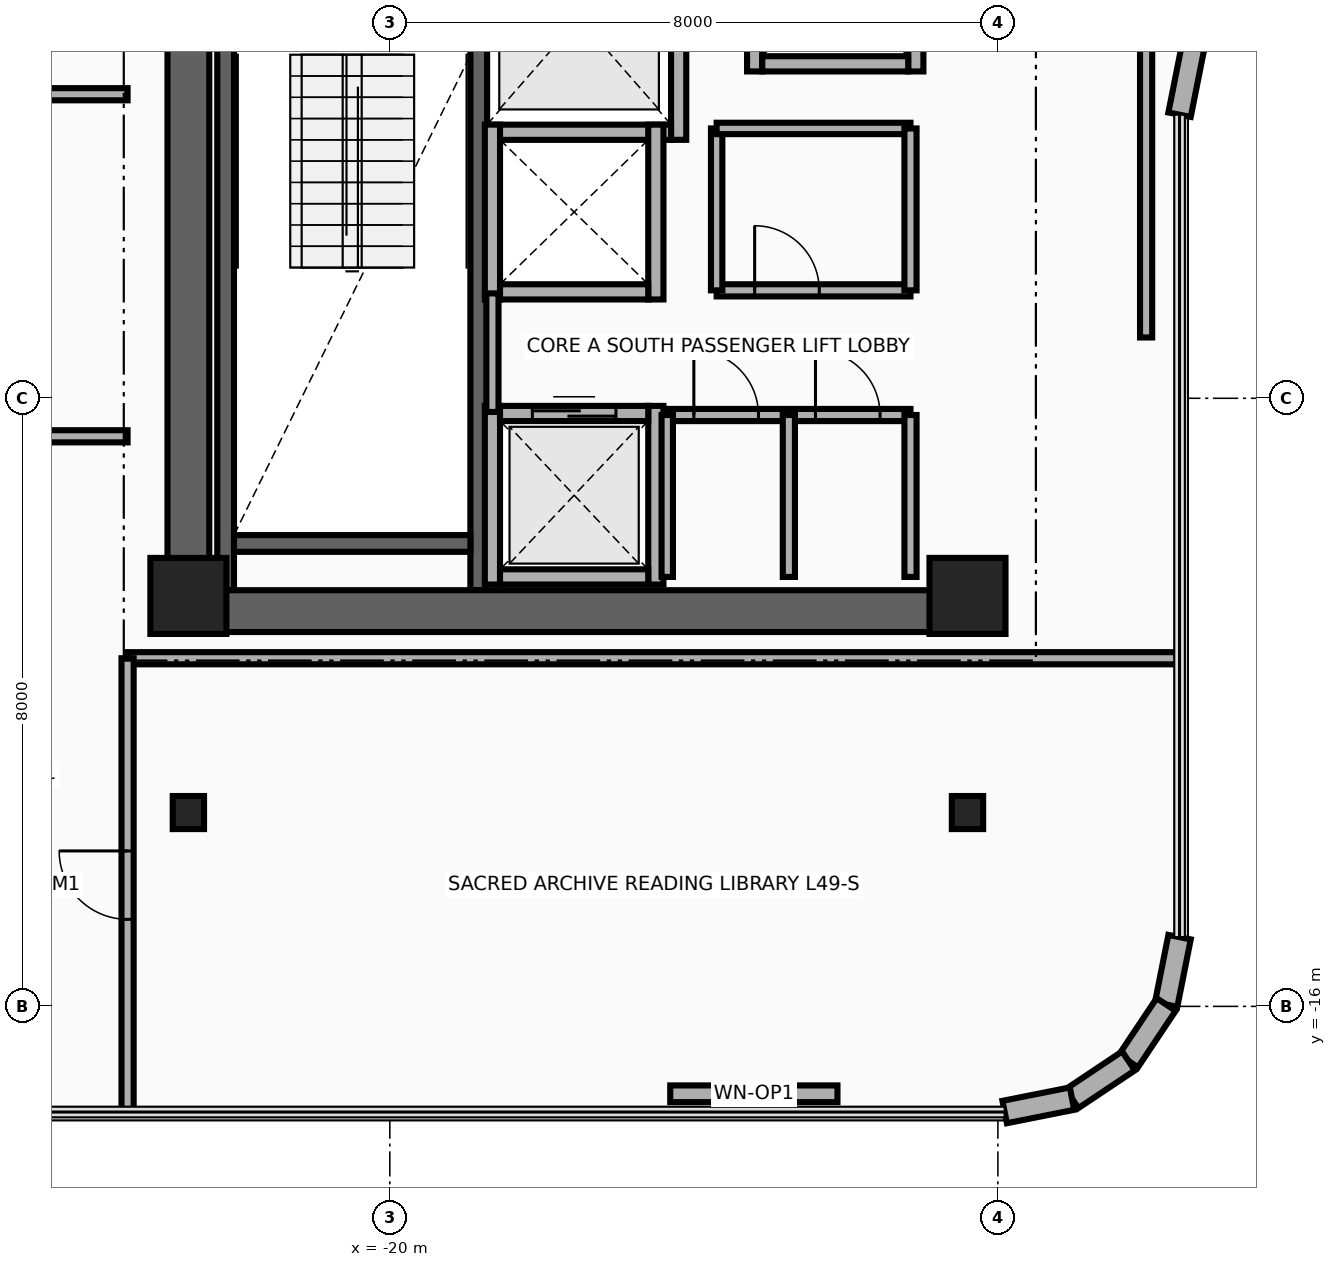
"""IFC4 building model, lengths in metres.
Left out: names, types, materials, properties, quantities, classifications, styles, units other than length and angle.
Written with IfcOpenShell. Run it as: python <this file> out.ifc"""

import sys

from ifc_helpers import new_model, si_unit, direction, frame, frame_2d, origin, origin_2d, place, context, subcontext, project, spatial, rectangle, i_section, extrude, source, transform, mapped, element, fill, save


model = new_model("IFC4")
c1 = context("Model", 3, precision=1e-05, world=origin(), true_north=direction((0.0, 1.0)))
c2 = subcontext(c1, "Body", "Model", "MODEL_VIEW")
j1 = project(units=[si_unit("LENGTHUNIT", "METRE"), si_unit("PLANEANGLEUNIT", "RADIAN")], contexts=[c1])
p1 = place(None, origin())
s1 = spatial("IfcSite", under=j1, at=p1, CompositionType="ELEMENT")
p2 = place(p1, origin())
s2 = spatial("IfcBuilding", under=s1, at=p2, CompositionType="ELEMENT")
p3 = place(p2, frame((0.0, 0.0, 192.35)))
s3 = spatial("IfcBuildingStorey", under=s2, at=p3, CompositionType="ELEMENT", Elevation=192.35)
for number, where, z_axis, x_axis in (
    (1, (-22.16, -10.525, 0.0), (0.0, 0.0, 1.0), (0.0, 1.0, 0.0)),
    (2, (-18.83, -10.525, 0.0), (0.0, 0.0, 1.0), (0.0, 1.0, 0.0)),
):
    element("IfcWall", number, at=place(p3, frame(where, z_axis=z_axis, x_axis=x_axis)), inside=s3, PredefinedType="SHEAR", context=c2, shape_type="SweptSolid", body=[
        extrude(rectangle(XDim=8.745, YDim=0.22, at=frame_2d((4.373, 0.0))), origin(), (0.0, 0.0, 1.0), 3.71),
    ])
p4 = place(p3, frame((-22.05, -9.91, 0.0), z_axis=(0.0, 0.0, 1.0), x_axis=(1.0, 0.0, 0.0)))
e3 = element("IfcWall", 3, at=p4, inside=s3, PredefinedType="SHEAR", context=c2, shape_type="SweptSolid", body=[
    extrude(rectangle(XDim=3.11, YDim=0.22, at=frame_2d((1.555, 0.0))), origin(), (0.0, 0.0, 1.0), 3.71),
])
p5 = place(p3, frame((-22.65, -11.075, 0.0), z_axis=(0.0, 0.0, 1.0), x_axis=(0.0, 1.0, 0.0)))
e4 = element("IfcWall", 4, at=p5, inside=s3, PredefinedType="SHEAR", context=c2, shape_type="SweptSolid", body=[
    extrude(rectangle(XDim=22.15, YDim=0.55, at=frame_2d((11.075, 0.0))), origin(), (0.0, 0.0, 1.0), 3.71),
])
p6 = place(p3, frame((-22.65, -10.8, 0.0), z_axis=(0.0, 0.0, 1.0), x_axis=(1.0, 0.0, 0.0)))
e5 = element("IfcWall", 5, at=p6, inside=s3, PredefinedType="SHEAR", context=c2, shape_type="SweptSolid", body=[
    extrude(rectangle(XDim=10.25, YDim=0.55, at=frame_2d((5.125, 0.0))), origin(), (0.0, 0.0, 1.0), 3.71),
])
m1 = source(origin(), c2, "Body", "SweptSolid", [
    extrude(rectangle(XDim=1.0, YDim=1.0, at=origin_2d()), origin(), (0.0, 0.0, 1.0), 3.95),
])
for number, where, z_axis, x_axis in (
    (6, (-22.65, -10.6, 0.0), (0.0, 0.0, 1.0), (1.0, 0.0, 0.0)),
    (7, (-12.4, -10.6, 0.0), (0.0, 0.0, 1.0), (1.0, 0.0, 0.0)),
):
    element("IfcColumn", number, at=place(p3, frame(where, z_axis=z_axis, x_axis=x_axis)), inside=s3, PredefinedType="COLUMN", context=c2, shape_type="MappedRepresentation", body=[
        mapped(m1, transform((0.0, 0.0, 0.0), x_axis=(1.0, 0.0, 0.0), y_axis=(0.0, 1.0, 0.0), z_axis=(0.0, 0.0, 1.0), scale=1.0)),
    ])
m2 = source(origin(), c2, "Body", "SweptSolid", [
    extrude(i_section(OverallWidth=0.412, OverallDepth=0.435, WebThickness=0.036, FlangeThickness=0.057, at=origin_2d()), origin(), (0.0, 0.0, 1.0), 3.95),
])
for number, where, z_axis, x_axis in (
    (8, (-22.65, -13.45, 0.0), (0.0, 0.0, 1.0), (1.0, 0.0, 0.0)),
    (9, (-12.4, -13.45, 0.0), (0.0, 0.0, 1.0), (1.0, 0.0, 0.0)),
):
    element("IfcColumn", number, at=place(p3, frame(where, z_axis=z_axis, x_axis=x_axis)), inside=s3, PredefinedType="COLUMN", context=c2, shape_type="MappedRepresentation", body=[
        mapped(m2, transform((0.0, 0.0, 0.0), x_axis=(1.0, 0.0, 0.0), y_axis=(0.0, 1.0, 0.0), z_axis=(0.0, 0.0, 1.0), scale=1.0)),
    ])
p7 = place(p3, frame((-9.43, -3.365, 0.0), z_axis=(0.0, 0.0, 1.0), x_axis=(-0.195301801101, -0.980743190895, 0.0)))
e10 = element("IfcWall", 10, at=p7, inside=s3, PredefinedType="SOLIDWALL", context=c2, shape_type="SweptSolid", body=[
    extrude(rectangle(XDim=0.923, YDim=0.3, at=frame_2d((0.461, 0.0))), origin(), (0.0, 0.0, 1.0), 3.71),
])
p8 = place(p3, frame((-9.61, -15.089, 0.0), z_axis=(0.0, 0.0, 1.0), x_axis=(-0.195025152871, -0.980798241101, 0.0)))
e11 = element("IfcWall", 11, at=p8, inside=s3, PredefinedType="SOLIDWALL", context=c2, shape_type="SweptSolid", body=[
    extrude(rectangle(XDim=0.904, YDim=0.3, at=frame_2d((0.452, 0.0))), origin(), (0.0, 0.0, 1.0), 3.71),
])
for number, where, z_axis, x_axis in (
    (12, (-9.786, -15.976, 0.0), (0.0, 0.0, 1.0), (-0.556, -0.832, 0.0)),
    (13, (-10.282, -16.718, 0.0), (0.0, 0.0, 1.0), (-0.832, -0.556, 0.0)),
):
    element("IfcWall", number, at=place(p3, frame(where, z_axis=z_axis, x_axis=x_axis)), inside=s3, PredefinedType="SOLIDWALL", context=c2, shape_type="SweptSolid", body=[
        extrude(rectangle(XDim=0.893, YDim=0.3, at=frame_2d((0.446, 0.0))), origin(), (0.0, 0.0, 1.0), 3.71),
    ])
p9 = place(p3, frame((-11.024, -17.214, 0.0), z_axis=(0.0, 0.0, 1.0), x_axis=(-0.980798241101, -0.195025152871, 0.0)))
e14 = element("IfcWall", 14, at=p9, inside=s3, PredefinedType="SOLIDWALL", context=c2, shape_type="SweptSolid", body=[
    extrude(rectangle(XDim=0.904, YDim=0.3, at=frame_2d((0.452, 0.0))), origin(), (0.0, 0.0, 1.0), 3.71),
])
p10 = place(p3, frame((-14.111, -17.15, 0.0), z_axis=(0.0, 0.0, 1.0), x_axis=(-1.0, 0.0, 0.0)))
e15 = element("IfcWall", 15, at=p10, inside=s3, PredefinedType="SOLIDWALL", context=c2, shape_type="SweptSolid", body=[
    extrude(rectangle(XDim=2.2, YDim=0.22, at=frame_2d((1.1, 0.0))), origin(), (0.0, 0.0, 1.0), 3.71),
])
p11 = place(p10, frame((0.65, 0.0, 0.95)))
e16 = element("IfcOpeningElement", 16, at=p11, cuts=e15, PredefinedType="OPENING", context=c2, shape_type="SweptSolid", body=[
    extrude(rectangle(XDim=0.9, YDim=1.3, at=frame_2d((0.45, 0.65))), frame((0.0, 0.125, 0.0), z_axis=(0.0, -1.0, 0.0), x_axis=(1.0, 0.0, 0.0)), (0.0, 0.0, 1.0), 0.25),
])
p12 = place(p3, frame((-16.2, -4.6, 0.0), z_axis=(0.0, 0.0, 1.0), x_axis=(0.0, 1.0, 0.0)))
e17 = element("IfcWall", 17, at=p12, inside=s3, PredefinedType="MOVABLE", context=c2, shape_type="SweptSolid", body=[
    extrude(rectangle(XDim=3.2, YDim=0.2, at=frame_2d((1.6, 0.0))), origin(), (0.0, 0.0, 1.0), 3.71),
])
p13 = place(p3, frame((-18.72, -4.5, 0.0), z_axis=(0.0, 0.0, 1.0), x_axis=(1.0, 0.0, 0.0)))
e18 = element("IfcWall", 18, at=p13, inside=s3, PredefinedType="MOVABLE", context=c2, shape_type="SweptSolid", body=[
    extrude(rectangle(XDim=2.42, YDim=0.2, at=frame_2d((1.21, 0.0))), origin(), (0.0, 0.0, 1.0), 3.71),
])
for number, where, z_axis, x_axis in (
    (19, (-18.65, -10.45, 0.0), (0.0, 0.0, 1.0), (0.0, 1.0, 0.0)),
    (20, (-16.5, -10.45, 0.0), (0.0, 0.0, 1.0), (0.0, 1.0, 0.0)),
):
    element("IfcWall", number, at=place(p3, frame(where, z_axis=z_axis, x_axis=x_axis)), inside=s3, PredefinedType="MOVABLE", context=c2, shape_type="SweptSolid", body=[
        extrude(rectangle(XDim=2.35, YDim=0.2, at=frame_2d((1.175, 0.0))), origin(), (0.0, 0.0, 1.0), 2.994),
    ])
p14 = place(p3, frame((-18.55, -10.35, 0.0), z_axis=(0.0, 0.0, 1.0), x_axis=(1.0, 0.0, 0.0)))
e21 = element("IfcWall", 21, at=p14, inside=s3, PredefinedType="MOVABLE", context=c2, shape_type="SweptSolid", body=[
    extrude(rectangle(XDim=1.95, YDim=0.2, at=frame_2d((0.975, 0.0))), origin(), (0.0, 0.0, 1.0), 2.994),
])
p15 = place(p3, frame((-18.55, -8.2, 0.0), z_axis=(0.0, 0.0, 1.0), x_axis=(1.0, 0.0, 0.0)))
e22 = element("IfcWall", 22, at=p15, inside=s3, PredefinedType="MOVABLE", context=c2, shape_type="SweptSolid", body=[
    extrude(rectangle(XDim=1.95, YDim=0.2, at=frame_2d((0.975, 0.0))), origin(), (0.0, 0.0, 1.0), 3.71),
])
p16 = place(p15, frame((0.425, 0.0, 0.0)))
e23 = element("IfcOpeningElement", 23, at=p16, cuts=e22, PredefinedType="OPENING", context=c2, shape_type="SweptSolid", body=[
    extrude(rectangle(XDim=1.1, YDim=2.1, at=frame_2d((0.55, 1.05))), frame((0.0, 0.115, 0.0), z_axis=(0.0, -1.0, 0.0), x_axis=(1.0, 0.0, 0.0)), (0.0, 0.0, 1.0), 0.23),
])
for number, where, z_axis, x_axis in (
    (24, (-18.65, -6.7, 0.0), (0.0, 0.0, 1.0), (0.0, 1.0, 0.0)),
    (25, (-16.5, -6.7, 0.0), (0.0, 0.0, 1.0), (0.0, 1.0, 0.0)),
):
    element("IfcWall", number, at=place(p3, frame(where, z_axis=z_axis, x_axis=x_axis)), inside=s3, PredefinedType="MOVABLE", context=c2, shape_type="SweptSolid", body=[
        extrude(rectangle(XDim=2.3, YDim=0.2, at=frame_2d((1.15, 0.0))), origin(), (0.0, 0.0, 1.0), 3.71),
    ])
p17 = place(p3, frame((-18.55, -6.6, 0.0), z_axis=(0.0, 0.0, 1.0), x_axis=(1.0, 0.0, 0.0)))
e26 = element("IfcWall", 26, at=p17, inside=s3, PredefinedType="MOVABLE", context=c2, shape_type="SweptSolid", body=[
    extrude(rectangle(XDim=1.95, YDim=0.2, at=frame_2d((0.975, 0.0))), origin(), (0.0, 0.0, 1.0), 3.71),
])
for number, where, z_axis, x_axis in (
    (27, (-15.2, -3.7, 0.0), (0.0, 0.0, 1.0), (0.0, 1.0, 0.0)),
    (28, (-13.08, -3.7, 0.0), (0.0, 0.0, 1.0), (0.0, 1.0, 0.0)),
):
    element("IfcWall", number, at=place(p3, frame(where, z_axis=z_axis, x_axis=x_axis)), inside=s3, PredefinedType="MOVABLE", context=c2, shape_type="SweptSolid", body=[
        extrude(rectangle(XDim=2.35, YDim=0.2, at=frame_2d((1.175, 0.0))), origin(), (0.0, 0.0, 1.0), 3.71),
    ])
p18 = place(p3, frame((-15.1, -3.6, 0.0), z_axis=(0.0, 0.0, 1.0), x_axis=(1.0, 0.0, 0.0)))
e29 = element("IfcWall", 29, at=p18, inside=s3, PredefinedType="MOVABLE", context=c2, shape_type="SweptSolid", body=[
    extrude(rectangle(XDim=1.92, YDim=0.2, at=frame_2d((0.96, 0.0))), origin(), (0.0, 0.0, 1.0), 3.71),
])
p19 = place(p3, frame((-18.65, -8.18, 0.0), z_axis=(0.0, 0.0, 1.0), x_axis=(0.0, 1.0, 0.0)))
e30 = element("IfcWall", 30, at=p19, inside=s3, PredefinedType="PARTITIONING", context=c2, shape_type="SweptSolid", body=[
    extrude(rectangle(XDim=1.56, YDim=0.16, at=frame_2d((0.78, 0.0))), origin(), (0.0, 0.0, 1.0), 3.71),
])
p20 = place(p3, frame((-16.35, -8.22, 0.0), z_axis=(0.0, 0.0, 1.0), x_axis=(1.0, 0.0, 0.0)))
e31 = element("IfcWall", 31, at=p20, inside=s3, PredefinedType="PARTITIONING", context=c2, shape_type="SweptSolid", body=[
    extrude(rectangle(XDim=3.2, YDim=0.16, at=frame_2d((1.6, 0.0))), origin(), (0.0, 0.0, 1.0), 3.71),
])
p21 = place(p20, frame((0.35, 0.0, 0.0)))
e32 = element("IfcOpeningElement", 32, at=p21, cuts=e31, PredefinedType="OPENING", context=c2, shape_type="SweptSolid", body=[
    extrude(rectangle(XDim=0.85, YDim=2.05, at=frame_2d((0.425, 1.025))), frame((0.0, 0.095, 0.0), z_axis=(0.0, -1.0, 0.0), x_axis=(1.0, 0.0, 0.0)), (0.0, 0.0, 1.0), 0.19),
])
p22 = place(p20, frame((1.95, 0.0, 0.0)))
e33 = element("IfcOpeningElement", 33, at=p22, cuts=e31, PredefinedType="OPENING", context=c2, shape_type="SweptSolid", body=[
    extrude(rectangle(XDim=0.85, YDim=2.05, at=frame_2d((0.425, 1.025))), frame((0.0, 0.095, 0.0), z_axis=(0.0, -1.0, 0.0), x_axis=(1.0, 0.0, 0.0)), (0.0, 0.0, 1.0), 0.19),
])
p23 = place(p3, frame((-16.35, -10.35, 0.0), z_axis=(0.0, 0.0, 1.0), x_axis=(0.0, 1.0, 0.0)))
e34 = element("IfcWall", 34, at=p23, inside=s3, PredefinedType="PARTITIONING", context=c2, shape_type="SweptSolid", body=[
    extrude(rectangle(XDim=2.13, YDim=0.15, at=frame_2d((1.065, 0.0))), origin(), (0.0, 0.0, 1.0), 3.71),
])
for number, where, z_axis, x_axis in (
    (35, (-13.15, -10.35, 0.0), (0.0, 0.0, 1.0), (0.0, 1.0, 0.0)),
    (36, (-14.75, -10.35, 0.0), (0.0, 0.0, 1.0), (0.0, 1.0, 0.0)),
):
    element("IfcWall", number, at=place(p3, frame(where, z_axis=z_axis, x_axis=x_axis)), inside=s3, PredefinedType="PARTITIONING", context=c2, shape_type="SweptSolid", body=[
        extrude(rectangle(XDim=2.13, YDim=0.16, at=frame_2d((1.065, 0.0))), origin(), (0.0, 0.0, 1.0), 3.71),
    ])
p24 = place(p3, frame((-15.7, -6.58, 0.0), z_axis=(0.0, 0.0, 1.0), x_axis=(1.0, 0.0, 0.0)))
e37 = element("IfcWall", 37, at=p24, inside=s3, PredefinedType="PARTITIONING", context=c2, shape_type="SweptSolid", body=[
    extrude(rectangle(XDim=2.55, YDim=0.16, at=frame_2d((1.275, 0.0))), origin(), (0.0, 0.0, 1.0), 3.71),
])
p25 = place(p24, frame((0.5, 0.0, 0.0)))
e38 = element("IfcOpeningElement", 38, at=p25, cuts=e37, PredefinedType="OPENING", context=c2, shape_type="SweptSolid", body=[
    extrude(rectangle(XDim=0.85, YDim=2.05, at=frame_2d((0.425, 1.025))), frame((0.0, 0.095, 0.0), z_axis=(0.0, -1.0, 0.0), x_axis=(1.0, 0.0, 0.0)), (0.0, 0.0, 1.0), 0.19),
])
p26 = place(p3, frame((-15.7, -6.58, 0.0), z_axis=(0.0, 0.0, 1.0), x_axis=(0.0, 1.0, 0.0)))
e39 = element("IfcWall", 39, at=p26, inside=s3, PredefinedType="PARTITIONING", context=c2, shape_type="SweptSolid", body=[
    extrude(rectangle(XDim=2.13, YDim=0.15, at=frame_2d((1.065, 0.0))), origin(), (0.0, 0.0, 1.0), 3.71),
])
p27 = place(p3, frame((-15.7, -4.45, 0.0), z_axis=(0.0, 0.0, 1.0), x_axis=(1.0, 0.0, 0.0)))
e40 = element("IfcWall", 40, at=p27, inside=s3, PredefinedType="PARTITIONING", context=c2, shape_type="SweptSolid", body=[
    extrude(rectangle(XDim=2.55, YDim=0.15, at=frame_2d((1.275, 0.0))), origin(), (0.0, 0.0, 1.0), 3.71),
])
p28 = place(p3, frame((-13.15, -6.58, 0.0), z_axis=(0.0, 0.0, 1.0), x_axis=(0.0, 1.0, 0.0)))
e41 = element("IfcWall", 41, at=p28, inside=s3, PredefinedType="PARTITIONING", context=c2, shape_type="SweptSolid", body=[
    extrude(rectangle(XDim=2.13, YDim=0.16, at=frame_2d((1.065, 0.0))), origin(), (0.0, 0.0, 1.0), 3.71),
])
p29 = place(p3, frame((-23.45, -11.42, 0.0), z_axis=(0.0, 0.0, 1.0), x_axis=(1.0, 0.0, 0.0)))
e42 = element("IfcWall", 42, at=p29, inside=s3, PredefinedType="PARTITIONING", context=c2, shape_type="SweptSolid", body=[
    extrude(rectangle(XDim=13.84, YDim=0.16, at=frame_2d((6.92, 0.0))), origin(), (0.0, 0.0, 1.0), 3.084),
])
p30 = place(p3, frame((-23.45, -17.39, 0.0), z_axis=(0.0, 0.0, 1.0), x_axis=(0.0, 1.0, 0.0)))
e43 = element("IfcWall", 43, at=p30, inside=s3, PredefinedType="PARTITIONING", context=c2, shape_type="SweptSolid", body=[
    extrude(rectangle(XDim=5.97, YDim=0.16, at=frame_2d((2.985, 0.0))), origin(), (0.0, 0.0, 1.0), 3.71),
])
p31 = place(p30, frame((2.535, 0.0, 0.0)))
e44 = element("IfcOpeningElement", 44, at=p31, cuts=e43, PredefinedType="OPENING", context=c2, shape_type="SweptSolid", body=[
    extrude(rectangle(XDim=0.9, YDim=2.1, at=frame_2d((0.45, 1.05))), frame((0.0, 0.095, 0.0), z_axis=(0.0, -1.0, 0.0), x_axis=(1.0, 0.0, 0.0)), (0.0, 0.0, 1.0), 0.19),
])
p32 = place(p3, frame((-30.89, -8.5, 0.0), z_axis=(0.0, 0.0, 1.0), x_axis=(1.0, 0.0, 0.0)))
e45 = element("IfcWall", 45, at=p32, inside=s3, PredefinedType="PARTITIONING", context=c2, shape_type="SweptSolid", body=[
    extrude(rectangle(XDim=7.44, YDim=0.16, at=frame_2d((3.72, 0.0))), origin(), (0.0, 0.0, 1.0), 3.156),
])
p33 = place(p32, frame((2.82, 0.0, 0.0)))
e46 = element("IfcOpeningElement", 46, at=p33, cuts=e45, PredefinedType="OPENING", context=c2, shape_type="SweptSolid", body=[
    extrude(rectangle(XDim=1.8, YDim=2.15, at=frame_2d((0.9, 1.075))), frame((0.0, 0.095, 0.0), z_axis=(0.0, -1.0, 0.0), x_axis=(1.0, 0.0, 0.0)), (0.0, 0.0, 1.0), 0.19),
])
p34 = place(p3, frame((-30.89, -4.0, 0.0), z_axis=(0.0, 0.0, 1.0), x_axis=(1.0, 0.0, 0.0)))
e47 = element("IfcWall", 47, at=p34, inside=s3, PredefinedType="PARTITIONING", context=c2, shape_type="SweptSolid", body=[
    extrude(rectangle(XDim=7.44, YDim=0.16, at=frame_2d((3.72, 0.0))), origin(), (0.0, 0.0, 1.0), 3.156),
])
p35 = place(p34, frame((3.2, 0.0, 0.0)))
e48 = element("IfcOpeningElement", 48, at=p35, cuts=e47, PredefinedType="OPENING", context=c2, shape_type="SweptSolid", body=[
    extrude(rectangle(XDim=1.8, YDim=2.15, at=frame_2d((0.9, 1.075))), frame((0.0, 0.095, 0.0), z_axis=(0.0, -1.0, 0.0), x_axis=(1.0, 0.0, 0.0)), (0.0, 0.0, 1.0), 0.19),
])
p36 = place(p3, frame((-10.05, -7.2, 0.0), z_axis=(0.0, 0.0, 1.0), x_axis=(0.0, 1.0, 0.0)))
e49 = element("IfcWall", 49, at=p36, inside=s3, PredefinedType="PARTITIONING", context=c2, shape_type="SweptSolid", body=[
    extrude(rectangle(XDim=18.62, YDim=0.16, at=frame_2d((9.31, 0.0))), origin(), (0.0, 0.0, 1.0), 2.495),
])
p37 = place(p36, frame((12.0, 0.0, 0.0)))
e50 = element("IfcOpeningElement", 50, at=p37, cuts=e49, PredefinedType="OPENING", context=c2, shape_type="SweptSolid", body=[
    extrude(rectangle(XDim=1.8, YDim=2.15, at=frame_2d((0.9, 1.075))), frame((0.0, 0.095, 0.0), z_axis=(0.0, -1.0, 0.0), x_axis=(1.0, 0.0, 0.0)), (0.0, 0.0, 1.0), 0.19),
])
p38 = place(p11, origin())
e51 = element("IfcWindow", 51, at=p38, inside=s3, PartitioningType="SINGLE_PANEL", PredefinedType="WINDOW", context=c2, shape_type="SweptSolid", body=[
    extrude(rectangle(XDim=0.9, YDim=1.3, at=frame_2d((0.45, 0.65))), frame((0.0, 0.03, 0.0), z_axis=(0.0, -1.0, 0.0), x_axis=(1.0, 0.0, 0.0)), (0.0, 0.0, 1.0), 0.06),
])
fill(e16, e51)
p39 = place(p16, origin())
e52 = element("IfcDoor", 52, at=p39, inside=s3, OperationType="DOUBLE_DOOR_SLIDING", PredefinedType="DOOR", context=c2, shape_type="SweptSolid", body=[
    extrude(rectangle(XDim=1.1, YDim=2.1, at=frame_2d((0.55, 1.05))), frame((0.0, 0.025, 0.0), z_axis=(0.0, -1.0, 0.0), x_axis=(1.0, 0.0, 0.0)), (0.0, 0.0, 1.0), 0.05),
])
fill(e23, e52)
p40 = place(p21, origin())
e53 = element("IfcDoor", 53, at=p40, inside=s3, OperationType="SINGLE_SWING_RIGHT", PredefinedType="DOOR", context=c2, shape_type="SweptSolid", body=[
    extrude(rectangle(XDim=0.85, YDim=2.05, at=frame_2d((0.425, 1.025))), frame((0.0, 0.025, 0.0), z_axis=(0.0, -1.0, 0.0), x_axis=(1.0, 0.0, 0.0)), (0.0, 0.0, 1.0), 0.05),
])
fill(e32, e53)
p41 = place(p22, origin())
e54 = element("IfcDoor", 54, at=p41, inside=s3, OperationType="SINGLE_SWING_LEFT", PredefinedType="DOOR", context=c2, shape_type="SweptSolid", body=[
    extrude(rectangle(XDim=0.85, YDim=2.05, at=frame_2d((0.425, 1.025))), frame((0.0, 0.025, 0.0), z_axis=(0.0, -1.0, 0.0), x_axis=(1.0, 0.0, 0.0)), (0.0, 0.0, 1.0), 0.05),
])
fill(e33, e54)
p42 = place(p25, origin())
e55 = element("IfcDoor", 55, at=p42, inside=s3, OperationType="SINGLE_SWING_RIGHT", PredefinedType="DOOR", context=c2, shape_type="SweptSolid", body=[
    extrude(rectangle(XDim=0.85, YDim=2.05, at=frame_2d((0.425, 1.025))), frame((0.0, 0.025, 0.0), z_axis=(0.0, -1.0, 0.0), x_axis=(1.0, 0.0, 0.0)), (0.0, 0.0, 1.0), 0.05),
])
fill(e38, e55)
p43 = place(p31, origin())
e56 = element("IfcDoor", 56, at=p43, inside=s3, OperationType="SINGLE_SWING_RIGHT", PredefinedType="DOOR", context=c2, shape_type="SweptSolid", body=[
    extrude(rectangle(XDim=0.9, YDim=2.1, at=frame_2d((0.45, 1.05))), frame((0.0, 0.025, 0.0), z_axis=(0.0, -1.0, 0.0), x_axis=(1.0, 0.0, 0.0)), (0.0, 0.0, 1.0), 0.05),
])
fill(e44, e56)
save(model, sys.argv[1])
